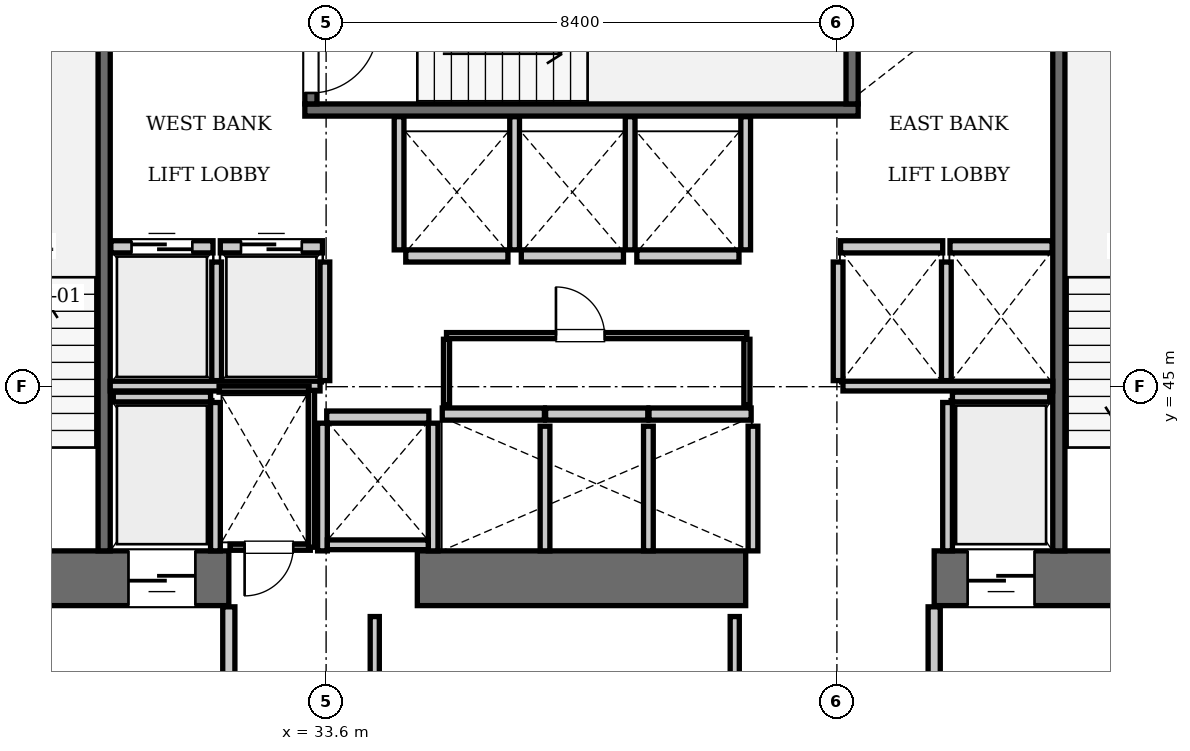
"""IFC4 building model, lengths in metres.
Left out: names, types, materials, properties, quantities, classifications, styles, units other than length and angle.
Written with IfcOpenShell. Run it as: python <this file> out.ifc"""

import sys

from ifc_helpers import new_model, si_unit, direction, frame, frame_2d, origin, place, context, subcontext, project, spatial, rectangle, extrude, element, fill, save


model = new_model("IFC4")
c1 = context("Model", 3, precision=1e-05, world=origin(), true_north=direction((0.0, 1.0)))
c2 = subcontext(c1, "Body", "Model", "MODEL_VIEW")
j1 = project(units=[si_unit("LENGTHUNIT", "METRE"), si_unit("PLANEANGLEUNIT", "RADIAN")], contexts=[c1])
p1 = place(None, origin())
s1 = spatial("IfcSite", under=j1, at=p1, CompositionType="ELEMENT")
p2 = place(p1, origin())
s2 = spatial("IfcBuilding", under=s1, at=p2, CompositionType="ELEMENT")
p3 = place(p2, frame((0.0, 0.0, 88.55)))
s3 = spatial("IfcBuildingStorey", under=s2, at=p3, CompositionType="ELEMENT", Elevation=88.55)
p4 = place(p3, frame((25.2, 41.85, 0.0), z_axis=(0.0, 0.0, 1.0), x_axis=(1.0, 0.0, 0.0)))
e1 = element("IfcWall", 1, at=p4, inside=s3, PredefinedType="SHEAR", context=c2, shape_type="SweptSolid", body=[
    extrude(rectangle(XDim=6.8, YDim=0.9, at=frame_2d((3.4, 0.0))), origin(), (0.0, 0.0, 1.0), 3.85),
])
p5 = place(p4, frame((1.65, 0.0, 0.0)))
e2 = element("IfcOpeningElement", 2, at=p5, cuts=e1, PredefinedType="OPENING", context=c2, shape_type="SweptSolid", body=[
    extrude(rectangle(XDim=1.15, YDim=2.15, at=frame_2d((0.575, 1.075))), frame((0.0, 0.46, 0.0), z_axis=(0.0, -1.0, 0.0), x_axis=(1.0, 0.0, 0.0)), (0.0, 0.0, 1.0), 0.92),
])
p6 = place(p4, frame((5.15, 0.0, 0.0)))
e3 = element("IfcOpeningElement", 3, at=p6, cuts=e1, PredefinedType="OPENING", context=c2, shape_type="SweptSolid", body=[
    extrude(rectangle(XDim=1.1, YDim=2.2, at=frame_2d((0.55, 1.1))), frame((0.0, 0.46, 0.0), z_axis=(0.0, -1.0, 0.0), x_axis=(1.0, 0.0, 0.0)), (0.0, 0.0, 1.0), 0.92),
])
p7 = place(p3, frame((35.1, 41.85, 0.0), z_axis=(0.0, 0.0, 1.0), x_axis=(1.0, 0.0, 0.0)))
e4 = element("IfcWall", 4, at=p7, inside=s3, PredefinedType="SHEAR", context=c2, shape_type="SweptSolid", body=[
    extrude(rectangle(XDim=5.4, YDim=0.9, at=frame_2d((2.7, 0.0))), origin(), (0.0, 0.0, 1.0), 3.85),
])
p8 = place(p3, frame((43.6, 41.85, 0.0), z_axis=(0.0, 0.0, 1.0), x_axis=(1.0, 0.0, 0.0)))
e5 = element("IfcWall", 5, at=p8, inside=s3, PredefinedType="SHEAR", context=c2, shape_type="SweptSolid", body=[
    extrude(rectangle(XDim=6.8, YDim=0.9, at=frame_2d((3.4, 0.0))), origin(), (0.0, 0.0, 1.0), 3.85),
])
p9 = place(p8, frame((3.9, 0.0, 0.0)))
e6 = element("IfcOpeningElement", 6, at=p9, cuts=e5, PredefinedType="OPENING", context=c2, shape_type="SweptSolid", body=[
    extrude(rectangle(XDim=1.15, YDim=2.15, at=frame_2d((0.575, 1.075))), frame((0.0, 0.46, 0.0), z_axis=(0.0, -1.0, 0.0), x_axis=(1.0, 0.0, 0.0)), (0.0, 0.0, 1.0), 0.92),
])
p10 = place(p8, frame((0.55, 0.0, 0.0)))
e7 = element("IfcOpeningElement", 7, at=p10, cuts=e5, PredefinedType="OPENING", context=c2, shape_type="SweptSolid", body=[
    extrude(rectangle(XDim=1.1, YDim=2.2, at=frame_2d((0.55, 1.1))), frame((0.0, 0.46, 0.0), z_axis=(0.0, -1.0, 0.0), x_axis=(1.0, 0.0, 0.0)), (0.0, 0.0, 1.0), 0.92),
])
p11 = place(p3, frame((29.95, 42.3, 0.0), z_axis=(0.0, 0.0, 1.0), x_axis=(0.0, 1.0, 0.0)))
e8 = element("IfcWall", 8, at=p11, inside=s3, PredefinedType="SOLIDWALL", context=c2, shape_type="SweptSolid", body=[
    extrude(rectangle(XDim=8.85, YDim=0.2, at=frame_2d((4.425, 0.0))), origin(), (0.0, 0.0, 1.0), 3.61),
])
p12 = place(p3, frame((33.25, 49.55, 0.0), z_axis=(0.0, 0.0, 1.0), x_axis=(1.0, 0.0, 0.0)))
e9 = element("IfcWall", 9, at=p12, inside=s3, PredefinedType="SOLIDWALL", context=c2, shape_type="SweptSolid", body=[
    extrude(rectangle(XDim=9.1, YDim=0.2, at=frame_2d((4.55, 0.0))), origin(), (0.0, 0.0, 1.0), 3.61),
])
p13 = place(p3, frame((42.25, 49.65, 0.0), z_axis=(0.0, 0.0, 1.0), x_axis=(0.0, 1.0, 0.0)))
e10 = element("IfcWall", 10, at=p13, inside=s3, PredefinedType="SOLIDWALL", context=c2, shape_type="SweptSolid", body=[
    extrude(rectangle(XDim=3.45, YDim=0.2, at=frame_2d((1.725, 0.0))), origin(), (0.0, 0.0, 1.0), 3.61),
])
p14 = place(p3, frame((33.35, 49.65, 0.0), z_axis=(0.0, 0.0, 1.0), x_axis=(0.0, 1.0, 0.0)))
e11 = element("IfcWall", 11, at=p14, inside=s3, PredefinedType="SOLIDWALL", context=c2, shape_type="SweptSolid", body=[
    extrude(rectangle(XDim=3.45, YDim=0.2, at=frame_2d((1.725, 0.0))), origin(), (0.0, 0.0, 1.0), 3.61),
])
p15 = place(p14, frame((0.18, 0.0, 0.0)))
e12 = element("IfcOpeningElement", 12, at=p15, cuts=e11, PredefinedType="OPENING", context=c2, shape_type="SweptSolid", body=[
    extrude(rectangle(XDim=1.1, YDim=2.15, at=frame_2d((0.55, 1.075))), frame((0.0, 0.11, 0.0), z_axis=(0.0, -1.0, 0.0), x_axis=(1.0, 0.0, 0.0)), (0.0, 0.0, 1.0), 0.22),
])
p16 = place(p3, frame((45.65, 42.3, 0.0), z_axis=(0.0, 0.0, 1.0), x_axis=(0.0, 1.0, 0.0)))
e13 = element("IfcWall", 13, at=p16, inside=s3, PredefinedType="SOLIDWALL", context=c2, shape_type="SweptSolid", body=[
    extrude(rectangle(XDim=8.85, YDim=0.2, at=frame_2d((4.425, 0.0))), origin(), (0.0, 0.0, 1.0), 3.61),
])
p17 = place(p3, frame((30.06, 47.3, 0.0), z_axis=(0.0, 0.0, 1.0), x_axis=(1.0, 0.0, 0.0)))
e14 = element("IfcWall", 14, at=p17, inside=s3, PredefinedType="SOLIDWALL", context=c2, shape_type="SweptSolid", body=[
    extrude(rectangle(XDim=1.68, YDim=0.2, at=frame_2d((0.84, 0.0))), origin(), (0.0, 0.0, 1.0), 3.61),
])
p18 = place(p17, frame((0.34, 0.0, 0.0)))
e15 = element("IfcOpeningElement", 15, at=p18, cuts=e14, PredefinedType="OPENING", context=c2, shape_type="SweptSolid", body=[
    extrude(rectangle(XDim=1.0, YDim=2.15, at=frame_2d((0.5, 1.075))), frame((0.0, 0.11, 0.0), z_axis=(0.0, -1.0, 0.0), x_axis=(1.0, 0.0, 0.0)), (0.0, 0.0, 1.0), 0.22),
])
p19 = place(p3, frame((31.86, 47.3, 0.0), z_axis=(0.0, 0.0, 1.0), x_axis=(1.0, 0.0, 0.0)))
e16 = element("IfcWall", 16, at=p19, inside=s3, PredefinedType="SOLIDWALL", context=c2, shape_type="SweptSolid", body=[
    extrude(rectangle(XDim=1.68, YDim=0.2, at=frame_2d((0.84, 0.0))), origin(), (0.0, 0.0, 1.0), 3.61),
])
p20 = place(p19, frame((0.34, 0.0, 0.0)))
e17 = element("IfcOpeningElement", 17, at=p20, cuts=e16, PredefinedType="OPENING", context=c2, shape_type="SweptSolid", body=[
    extrude(rectangle(XDim=1.0, YDim=2.15, at=frame_2d((0.5, 1.075))), frame((0.0, 0.11, 0.0), z_axis=(0.0, -1.0, 0.0), x_axis=(1.0, 0.0, 0.0)), (0.0, 0.0, 1.0), 0.22),
])
for number, where, z_axis, x_axis in (
    (18, (42.06, 47.3, 0.0), (0.0, 0.0, 1.0), (1.0, 0.0, 0.0)),
    (19, (43.86, 47.3, 0.0), (0.0, 0.0, 1.0), (1.0, 0.0, 0.0)),
    (20, (35.51, 44.55, 0.0), (0.0, 0.0, 1.0), (1.0, 0.0, 0.0)),
    (21, (37.21, 44.55, 0.0), (0.0, 0.0, 1.0), (1.0, 0.0, 0.0)),
):
    element("IfcWall", number, at=place(p3, frame(where, z_axis=z_axis, x_axis=x_axis)), inside=s3, PredefinedType="SOLIDWALL", context=c2, shape_type="SweptSolid", body=[
        extrude(rectangle(XDim=1.68, YDim=0.2, at=frame_2d((0.84, 0.0))), origin(), (0.0, 0.0, 1.0), 3.61),
    ])
for number, where, z_axis, x_axis in (
    (22, (38.91, 44.55, 0.0), (0.0, 0.0, 1.0), (1.0, 0.0, 0.0)),
    (23, (34.91, 47.15, 0.0), (0.0, 0.0, 1.0), (1.0, 0.0, 0.0)),
):
    element("IfcWall", number, at=place(p3, frame(where, z_axis=z_axis, x_axis=x_axis)), inside=s3, PredefinedType="SOLIDWALL", context=c2, shape_type="SweptSolid", body=[
        extrude(rectangle(XDim=1.68, YDim=0.2, at=frame_2d((0.84, 0.0))), origin(), (0.0, 0.0, 1.0), 3.61),
    ])
for number, where, z_axis, x_axis in (
    (24, (36.81, 47.15, 0.0), (0.0, 0.0, 1.0), (1.0, 0.0, 0.0)),
    (25, (38.71, 47.15, 0.0), (0.0, 0.0, 1.0), (1.0, 0.0, 0.0)),
    (26, (33.61, 44.5, 0.0), (0.0, 0.0, 1.0), (1.0, 0.0, 0.0)),
):
    element("IfcWall", number, at=place(p3, frame(where, z_axis=z_axis, x_axis=x_axis)), inside=s3, PredefinedType="SOLIDWALL", context=c2, shape_type="SweptSolid", body=[
        extrude(rectangle(XDim=1.68, YDim=0.2, at=frame_2d((0.84, 0.0))), origin(), (0.0, 0.0, 1.0), 3.61),
    ])
p21 = place(p3, frame((30.1, 44.83, 0.0), z_axis=(0.0, 0.0, 1.0), x_axis=(1.0, 0.0, 0.0)))
e27 = element("IfcWall", 27, at=p21, inside=s3, PredefinedType="SOLIDWALL", context=c2, shape_type="SweptSolid", body=[
    extrude(rectangle(XDim=1.6, YDim=0.16, at=frame_2d((0.8, 0.0))), origin(), (0.0, 0.0, 1.0), 3.61),
])
p22 = place(p3, frame((31.78, 42.3, 0.0), z_axis=(0.0, 0.0, 1.0), x_axis=(0.0, 1.0, 0.0)))
e28 = element("IfcWall", 28, at=p22, inside=s3, PredefinedType="SOLIDWALL", context=c2, shape_type="SweptSolid", body=[
    extrude(rectangle(XDim=2.44, YDim=0.16, at=frame_2d((1.22, 0.0))), origin(), (0.0, 0.0, 1.0), 3.61),
])
p23 = place(p3, frame((43.9, 44.83, 0.0), z_axis=(0.0, 0.0, 1.0), x_axis=(1.0, 0.0, 0.0)))
e29 = element("IfcWall", 29, at=p23, inside=s3, PredefinedType="SOLIDWALL", context=c2, shape_type="SweptSolid", body=[
    extrude(rectangle(XDim=1.6, YDim=0.16, at=frame_2d((0.8, 0.0))), origin(), (0.0, 0.0, 1.0), 3.61),
])
p24 = place(p3, frame((43.82, 42.3, 0.0), z_axis=(0.0, 0.0, 1.0), x_axis=(0.0, 1.0, 0.0)))
e30 = element("IfcWall", 30, at=p24, inside=s3, PredefinedType="SOLIDWALL", context=c2, shape_type="SweptSolid", body=[
    extrude(rectangle(XDim=2.44, YDim=0.16, at=frame_2d((1.22, 0.0))), origin(), (0.0, 0.0, 1.0), 3.61),
])
for number, where, z_axis, x_axis in (
    (31, (31.8, 45.1, 0.0), (0.0, 0.0, 1.0), (0.0, 1.0, 0.0)),
    (32, (33.58, 45.1, 0.0), (0.0, 0.0, 1.0), (0.0, 1.0, 0.0)),
):
    element("IfcWall", number, at=place(p3, frame(where, z_axis=z_axis, x_axis=x_axis)), inside=s3, PredefinedType="SOLIDWALL", context=c2, shape_type="SweptSolid", body=[
        extrude(rectangle(XDim=1.95, YDim=0.16, at=frame_2d((0.975, 0.0))), origin(), (0.0, 0.0, 1.0), 3.61),
    ])
p25 = place(p3, frame((30.05, 45.01, 0.0), z_axis=(0.0, 0.0, 1.0), x_axis=(1.0, 0.0, 0.0)))
e33 = element("IfcWall", 33, at=p25, inside=s3, PredefinedType="SOLIDWALL", context=c2, shape_type="SweptSolid", body=[
    extrude(rectangle(XDim=3.45, YDim=0.16, at=frame_2d((1.725, 0.0))), origin(), (0.0, 0.0, 1.0), 3.61),
])
for number, where, z_axis, x_axis in (
    (34, (42.02, 45.1, 0.0), (0.0, 0.0, 1.0), (0.0, 1.0, 0.0)),
    (35, (43.8, 45.1, 0.0), (0.0, 0.0, 1.0), (0.0, 1.0, 0.0)),
):
    element("IfcWall", number, at=place(p3, frame(where, z_axis=z_axis, x_axis=x_axis)), inside=s3, PredefinedType="SOLIDWALL", context=c2, shape_type="SweptSolid", body=[
        extrude(rectangle(XDim=1.95, YDim=0.16, at=frame_2d((0.975, 0.0))), origin(), (0.0, 0.0, 1.0), 3.61),
    ])
p26 = place(p3, frame((42.1, 45.01, 0.0), z_axis=(0.0, 0.0, 1.0), x_axis=(1.0, 0.0, 0.0)))
e36 = element("IfcWall", 36, at=p26, inside=s3, PredefinedType="SOLIDWALL", context=c2, shape_type="SweptSolid", body=[
    extrude(rectangle(XDim=3.45, YDim=0.16, at=frame_2d((1.725, 0.0))), origin(), (0.0, 0.0, 1.0), 3.61),
])
for number, where, z_axis, x_axis in (
    (37, (37.2, 42.3, 0.0), (0.0, 0.0, 1.0), (0.0, 1.0, 0.0)),
    (38, (38.9, 42.3, 0.0), (0.0, 0.0, 1.0), (0.0, 1.0, 0.0)),
    (39, (40.62, 42.3, 0.0), (0.0, 0.0, 1.0), (0.0, 1.0, 0.0)),
):
    element("IfcWall", number, at=place(p3, frame(where, z_axis=z_axis, x_axis=x_axis)), inside=s3, PredefinedType="SOLIDWALL", context=c2, shape_type="SweptSolid", body=[
        extrude(rectangle(XDim=2.05, YDim=0.16, at=frame_2d((1.025, 0.0))), origin(), (0.0, 0.0, 1.0), 3.61),
    ])
for number, where, z_axis, x_axis in (
    (40, (34.8, 47.25, 0.0), (0.0, 0.0, 1.0), (0.0, 1.0, 0.0)),
    (41, (36.7, 47.25, 0.0), (0.0, 0.0, 1.0), (0.0, 1.0, 0.0)),
    (42, (38.6, 47.25, 0.0), (0.0, 0.0, 1.0), (0.0, 1.0, 0.0)),
    (43, (40.5, 47.25, 0.0), (0.0, 0.0, 1.0), (0.0, 1.0, 0.0)),
):
    element("IfcWall", number, at=place(p3, frame(where, z_axis=z_axis, x_axis=x_axis)), inside=s3, PredefinedType="SOLIDWALL", context=c2, shape_type="SweptSolid", body=[
        extrude(rectangle(XDim=2.19, YDim=0.16, at=frame_2d((1.095, 0.0))), origin(), (0.0, 0.0, 1.0), 3.61),
    ])
for number, where, z_axis, x_axis in (
    (44, (33.54, 42.3, 0.0), (0.0, 0.0, 1.0), (0.0, 1.0, 0.0)),
    (45, (35.36, 42.3, 0.0), (0.0, 0.0, 1.0), (0.0, 1.0, 0.0)),
):
    element("IfcWall", number, at=place(p3, frame(where, z_axis=z_axis, x_axis=x_axis)), inside=s3, PredefinedType="SOLIDWALL", context=c2, shape_type="SweptSolid", body=[
        extrude(rectangle(XDim=2.1, YDim=0.16, at=frame_2d((1.05, 0.0))), origin(), (0.0, 0.0, 1.0), 3.61),
    ])
p27 = place(p3, frame((33.62, 42.4, 0.0), z_axis=(0.0, 0.0, 1.0), x_axis=(1.0, 0.0, 0.0)))
e46 = element("IfcWall", 46, at=p27, inside=s3, PredefinedType="SOLIDWALL", context=c2, shape_type="SweptSolid", body=[
    extrude(rectangle(XDim=1.66, YDim=0.16, at=frame_2d((0.83, 0.0))), origin(), (0.0, 0.0, 1.0), 3.61),
])
for number, where, z_axis, x_axis in (
    (47, (32.0, 38.31, 0.0), (0.0, 0.0, 1.0), (0.0, 1.0, 0.0)),
    (48, (43.6, 38.31, 0.0), (0.0, 0.0, 1.0), (0.0, 1.0, 0.0)),
):
    element("IfcWall", number, at=place(p3, frame(where, z_axis=z_axis, x_axis=x_axis)), inside=s3, PredefinedType="PARTITIONING", context=c2, shape_type="SweptSolid", body=[
        extrude(rectangle(XDim=3.07, YDim=0.2, at=frame_2d((1.535, 0.0))), origin(), (0.0, 0.0, 1.0), 3.61),
    ])
p28 = place(p3, frame((32.02, 42.36, 0.0), z_axis=(0.0, 0.0, 1.0), x_axis=(1.0, 0.0, 0.0)))
e49 = element("IfcWall", 49, at=p28, inside=s3, PredefinedType="PARTITIONING", context=c2, shape_type="SweptSolid", body=[
    extrude(rectangle(XDim=1.32, YDim=0.1, at=frame_2d((0.66, 0.0))), origin(), (0.0, 0.0, 1.0), 3.61),
])
p29 = place(p28, frame((0.24, 0.0, 0.0)))
e50 = element("IfcOpeningElement", 50, at=p29, cuts=e49, PredefinedType="OPENING", context=c2, shape_type="SweptSolid", body=[
    extrude(rectangle(XDim=0.8, YDim=2.05, at=frame_2d((0.4, 1.025))), frame((0.0, 0.06, 0.0), z_axis=(0.0, -1.0, 0.0), x_axis=(1.0, 0.0, 0.0)), (0.0, 0.0, 1.0), 0.12),
])
p30 = place(p3, frame((31.84, 44.96, 0.0), z_axis=(0.0, 0.0, 1.0), x_axis=(1.0, 0.0, 0.0)))
e51 = element("IfcWall", 51, at=p30, inside=s3, PredefinedType="PARTITIONING", context=c2, shape_type="SweptSolid", body=[
    extrude(rectangle(XDim=1.48, YDim=0.1, at=frame_2d((0.74, 0.0))), origin(), (0.0, 0.0, 1.0), 3.61),
])
p31 = place(p3, frame((33.36, 42.36, 0.0), z_axis=(0.0, 0.0, 1.0), x_axis=(0.0, 1.0, 0.0)))
e52 = element("IfcWall", 52, at=p31, inside=s3, PredefinedType="PARTITIONING", context=c2, shape_type="SweptSolid", body=[
    extrude(rectangle(XDim=2.58, YDim=0.1, at=frame_2d((1.29, 0.0))), origin(), (0.0, 0.0, 1.0), 3.61),
])
p32 = place(p3, frame((35.58, 45.84, 0.0), z_axis=(0.0, 0.0, 1.0), x_axis=(1.0, 0.0, 0.0)))
e53 = element("IfcWall", 53, at=p32, inside=s3, PredefinedType="PARTITIONING", context=c2, shape_type="SweptSolid", body=[
    extrude(rectangle(XDim=4.94, YDim=0.1, at=frame_2d((2.47, 0.0))), origin(), (0.0, 0.0, 1.0), 3.61),
])
p33 = place(p32, frame((1.8, 0.0, 0.0)))
e54 = element("IfcOpeningElement", 54, at=p33, cuts=e53, PredefinedType="OPENING", context=c2, shape_type="SweptSolid", body=[
    extrude(rectangle(XDim=0.8, YDim=2.05, at=frame_2d((0.4, 1.025))), frame((0.0, 0.06, 0.0), z_axis=(0.0, -1.0, 0.0), x_axis=(1.0, 0.0, 0.0)), (0.0, 0.0, 1.0), 0.12),
])
for number, where, z_axis, x_axis in (
    (55, (35.58, 44.7, 0.0), (0.0, 0.0, 1.0), (0.0, 1.0, 0.0)),
    (56, (40.52, 44.7, 0.0), (0.0, 0.0, 1.0), (0.0, 1.0, 0.0)),
):
    element("IfcWall", number, at=place(p3, frame(where, z_axis=z_axis, x_axis=x_axis)), inside=s3, PredefinedType="PARTITIONING", context=c2, shape_type="SweptSolid", body=[
        extrude(rectangle(XDim=1.08, YDim=0.1, at=frame_2d((0.54, 0.0))), origin(), (0.0, 0.0, 1.0), 3.61),
    ])
for number, where, z_axis, x_axis in (
    (57, (34.4, 38.38, 0.0), (0.0, 0.0, 1.0), (0.0, 1.0, 0.0)),
    (58, (40.32, 38.38, 0.0), (0.0, 0.0, 1.0), (0.0, 1.0, 0.0)),
):
    element("IfcWall", number, at=place(p3, frame(where, z_axis=z_axis, x_axis=x_axis)), inside=s3, PredefinedType="PARTITIONING", context=c2, shape_type="SweptSolid", body=[
        extrude(rectangle(XDim=2.84, YDim=0.15, at=frame_2d((1.42, 0.0))), origin(), (0.0, 0.0, 1.0), 3.61),
    ])
p34 = place(p15, frame((1.1, 0.0, 0.0), z_axis=(0.0, 0.0, 1.0), x_axis=(-1.0, 0.0, 0.0)))
e59 = element("IfcDoor", 59, at=p34, inside=s3, OperationType="SINGLE_SWING_LEFT", PredefinedType="DOOR", context=c2, shape_type="SweptSolid", body=[
    extrude(rectangle(XDim=1.1, YDim=2.15, at=frame_2d((0.55, 1.075))), frame((0.0, 0.025, 0.0), z_axis=(0.0, -1.0, 0.0), x_axis=(1.0, 0.0, 0.0)), (0.0, 0.0, 1.0), 0.05),
])
fill(e12, e59)
p35 = place(p18, origin())
e60 = element("IfcDoor", 60, at=p35, inside=s3, OperationType="SLIDING_TO_LEFT", PredefinedType="DOOR", context=c2, shape_type="SweptSolid", body=[
    extrude(rectangle(XDim=1.0, YDim=2.15, at=frame_2d((0.5, 1.075))), frame((0.0, 0.025, 0.0), z_axis=(0.0, -1.0, 0.0), x_axis=(1.0, 0.0, 0.0)), (0.0, 0.0, 1.0), 0.05),
])
fill(e15, e60)
p36 = place(p20, origin())
e61 = element("IfcDoor", 61, at=p36, inside=s3, OperationType="SLIDING_TO_LEFT", PredefinedType="DOOR", context=c2, shape_type="SweptSolid", body=[
    extrude(rectangle(XDim=1.0, YDim=2.15, at=frame_2d((0.5, 1.075))), frame((0.0, 0.025, 0.0), z_axis=(0.0, -1.0, 0.0), x_axis=(1.0, 0.0, 0.0)), (0.0, 0.0, 1.0), 0.05),
])
fill(e17, e61)
p37 = place(p6, frame((1.1, 0.0, 0.0), z_axis=(0.0, 0.0, 1.0), x_axis=(-1.0, 0.0, 0.0)))
e62 = element("IfcDoor", 62, at=p37, inside=s3, OperationType="SLIDING_TO_LEFT", PredefinedType="DOOR", context=c2, shape_type="SweptSolid", body=[
    extrude(rectangle(XDim=1.1, YDim=2.2, at=frame_2d((0.55, 1.1))), frame((0.0, 0.025, 0.0), z_axis=(0.0, -1.0, 0.0), x_axis=(1.0, 0.0, 0.0)), (0.0, 0.0, 1.0), 0.05),
])
fill(e3, e62)
p38 = place(p10, frame((1.1, 0.0, 0.0), z_axis=(0.0, 0.0, 1.0), x_axis=(-1.0, 0.0, 0.0)))
e63 = element("IfcDoor", 63, at=p38, inside=s3, OperationType="SLIDING_TO_LEFT", PredefinedType="DOOR", context=c2, shape_type="SweptSolid", body=[
    extrude(rectangle(XDim=1.1, YDim=2.2, at=frame_2d((0.55, 1.1))), frame((0.0, 0.025, 0.0), z_axis=(0.0, -1.0, 0.0), x_axis=(1.0, 0.0, 0.0)), (0.0, 0.0, 1.0), 0.05),
])
fill(e7, e63)
p39 = place(p29, frame((0.8, 0.0, 0.0), z_axis=(0.0, 0.0, 1.0), x_axis=(-1.0, 0.0, 0.0)))
e64 = element("IfcDoor", 64, at=p39, inside=s3, OperationType="SINGLE_SWING_RIGHT", PredefinedType="DOOR", context=c2, shape_type="SweptSolid", body=[
    extrude(rectangle(XDim=0.8, YDim=2.05, at=frame_2d((0.4, 1.025))), frame((0.0, 0.025, 0.0), z_axis=(0.0, -1.0, 0.0), x_axis=(1.0, 0.0, 0.0)), (0.0, 0.0, 1.0), 0.05),
])
fill(e50, e64)
p40 = place(p33, origin())
e65 = element("IfcDoor", 65, at=p40, inside=s3, OperationType="SINGLE_SWING_LEFT", PredefinedType="DOOR", context=c2, shape_type="SweptSolid", body=[
    extrude(rectangle(XDim=0.8, YDim=2.05, at=frame_2d((0.4, 1.025))), frame((0.0, 0.025, 0.0), z_axis=(0.0, -1.0, 0.0), x_axis=(1.0, 0.0, 0.0)), (0.0, 0.0, 1.0), 0.05),
])
fill(e54, e65)
save(model, sys.argv[1])
